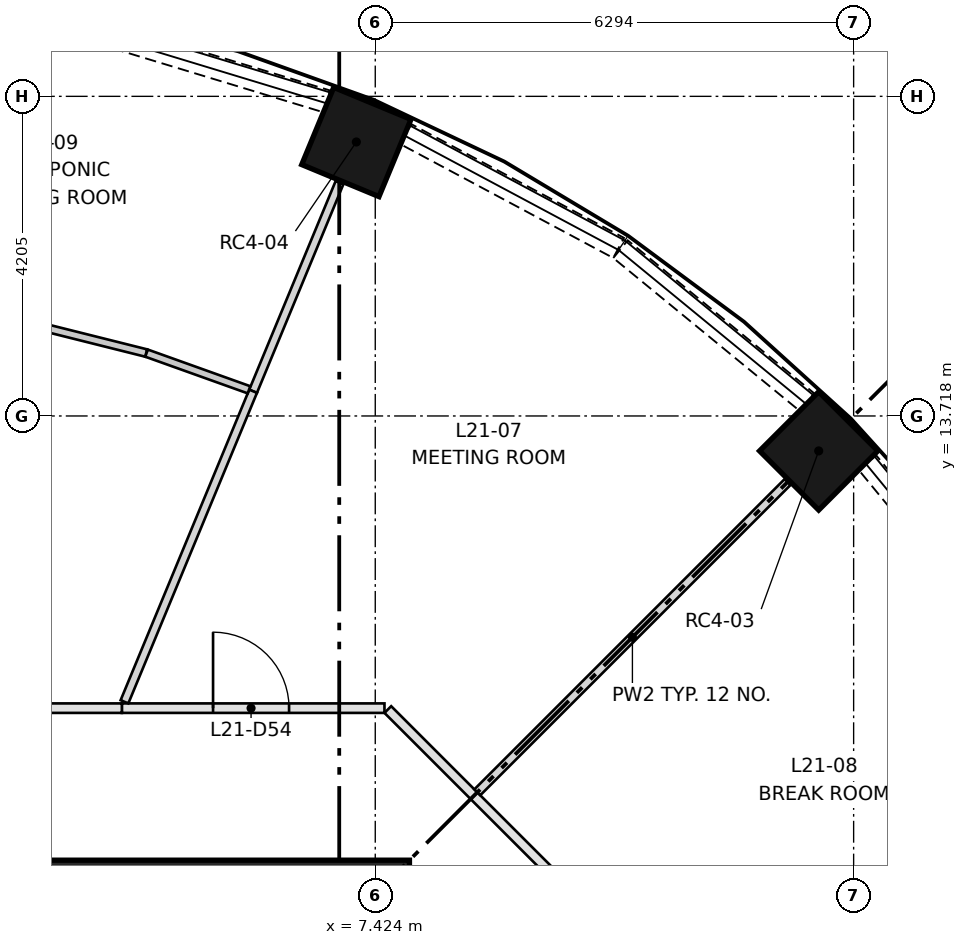
"""IFC4 building model, lengths in metres.
Left out: names, types, materials, properties, quantities, classifications, styles, units other than length and angle.
Written with IfcOpenShell. Run it as: python <this file> out.ifc"""

import sys

from ifc_helpers import new_model, si_unit, direction, frame, frame_2d, origin, origin_2d, place, context, subcontext, project, spatial, rectangle, extrude, element, fill, save


model = new_model("IFC4")
c1 = context("Model", 3, precision=1e-05, world=origin(), true_north=direction((0.0, 1.0)))
c2 = subcontext(c1, "Body", "Model", "MODEL_VIEW")
j1 = project(units=[si_unit("LENGTHUNIT", "METRE"), si_unit("PLANEANGLEUNIT", "RADIAN")], contexts=[c1])
p1 = place(None, origin())
s1 = spatial("IfcSite", under=j1, at=p1, CompositionType="ELEMENT")
p2 = place(p1, origin())
s2 = spatial("IfcBuilding", under=s1, at=p2, CompositionType="ELEMENT")
p3 = place(p2, frame((0.0, 0.0, 83.7)))
s3 = spatial("IfcBuildingStorey", under=s2, at=p3, CompositionType="ELEMENT", Elevation=83.7)
for number, where, z_axis, x_axis in (
    (1, (13.258, 13.258, 0.0), (0.0, 0.0, 1.0), (0.707, 0.707, 0.0)),
    (2, (7.175, 17.323, 0.0), (0.0, 0.0, 1.0), (0.383, 0.924, 0.0)),
):
    element("IfcColumn", number, at=place(p3, frame(where, z_axis=z_axis, x_axis=x_axis)), inside=s3, PredefinedType="COLUMN", context=c2, shape_type="SweptSolid", body=[
        extrude(rectangle(XDim=1.1, YDim=1.1, at=origin_2d()), origin(), (0.0, 0.0, 1.0), 3.65),
    ])
p4 = place(p3, frame((-7.874, 7.499, 0.0), z_axis=(0.0, 0.0, 1.0), x_axis=(1.0, 0.0, 0.0)))
e3 = element("IfcWall", 3, at=p4, inside=s3, PredefinedType="SHEAR", context=c2, shape_type="SweptSolid", body=[
    extrude(rectangle(XDim=15.748, YDim=0.75, at=frame_2d((7.874, 0.0))), origin(), (0.0, 0.0, 1.0), 3.65),
])
for number, where, z_axis, x_axis in (
    (4, (15.913, 10.651, 0.0), (0.0, 0.0, 1.0), (-0.634, 0.773, 0.0)),
    (5, (13.104, 13.9, 0.0), (0.0, 0.0, 1.0), (-0.773, 0.634, 0.0)),
):
    element("IfcWall", number, at=place(p3, frame(where, z_axis=z_axis, x_axis=x_axis)), inside=s3, PredefinedType="SOLIDWALL", context=c2, shape_type="SweptSolid", body=[
        extrude(rectangle(XDim=3.173, YDim=0.3, at=frame_2d((1.586, 0.0))), origin(), (0.0, 0.0, 1.0), 0.9),
    ])
p5 = place(p3, frame((10.626, 15.929, 0.0), z_axis=(0.0, 0.0, 1.0), x_axis=(-0.88188808669, 0.471458802606, 0.0)))
e6 = element("IfcWall", 6, at=p5, inside=s3, PredefinedType="SOLIDWALL", context=c2, shape_type="SweptSolid", body=[
    extrude(rectangle(XDim=3.172, YDim=0.3, at=frame_2d((1.586, 0.0))), origin(), (0.0, 0.0, 1.0), 0.9),
])
p6 = place(p3, frame((6.787, 17.856, 0.0), z_axis=(0.0, 0.0, 1.0), x_axis=(-0.956927923582, 0.290325591482, 0.0)))
e7 = element("IfcWall", 7, at=p6, inside=s3, PredefinedType="SOLIDWALL", context=c2, shape_type="SweptSolid", body=[
    extrude(rectangle(XDim=3.173, YDim=0.3, at=frame_2d((1.586, 0.0))), origin(), (0.0, 0.0, 1.0), 0.9),
])
p7 = place(p3, frame((8.722, 8.722, 0.0), z_axis=(0.0, 0.0, 1.0), x_axis=(0.70718294931, -0.707030604857, 0.0)))
e8 = element("IfcWall", 8, at=p7, inside=s3, PredefinedType="PARTITIONING", context=c2, shape_type="SweptSolid", body=[
    extrude(rectangle(XDim=1.603, YDim=0.125, at=frame_2d((0.801, 0.0))), origin(), (0.0, 0.0, 1.0), 3.3),
])
p8 = place(p3, frame((4.09, 9.874, 0.0), z_axis=(0.0, 0.0, 1.0), x_axis=(1.0, 0.0, 0.0)))
e9 = element("IfcWall", 9, at=p8, inside=s3, PredefinedType="PARTITIONING", context=c2, shape_type="SweptSolid", body=[
    extrude(rectangle(XDim=3.455, YDim=0.125, at=frame_2d((1.728, 0.0))), origin(), (0.0, 0.0, 1.0), 3.3),
])
p9 = place(p8, frame((1.2, 0.0, 0.0)))
e10 = element("IfcOpeningElement", 10, at=p9, cuts=e9, PredefinedType="OPENING", context=c2, shape_type="SweptSolid", body=[
    extrude(rectangle(XDim=1.0, YDim=2.1, at=frame_2d((0.5, 1.05))), frame((0.0, 0.073, 0.0), z_axis=(0.0, -1.0, 0.0), x_axis=(1.0, 0.0, 0.0)), (0.0, 0.0, 1.0), 0.145),
])
p10 = place(p3, frame((7.589, 9.856, 0.0), z_axis=(0.0, 0.0, 1.0), x_axis=(0.707030604857, -0.70718294931, 0.0)))
e11 = element("IfcWall", 11, at=p10, inside=s3, PredefinedType="PARTITIONING", context=c2, shape_type="SweptSolid", body=[
    extrude(rectangle(XDim=1.603, YDim=0.125, at=frame_2d((0.801, 0.0))), origin(), (0.0, 0.0, 1.0), 3.3),
])
p11 = place(p3, frame((-4.09, 9.874, 0.0), z_axis=(0.0, 0.0, 1.0), x_axis=(1.0, 0.0, 0.0)))
e12 = element("IfcWall", 12, at=p11, inside=s3, PredefinedType="PARTITIONING", context=c2, shape_type="SweptSolid", body=[
    extrude(rectangle(XDim=8.18, YDim=0.125, at=frame_2d((4.09, 0.0))), origin(), (0.0, 0.0, 1.0), 3.3),
])
p12 = place(p11, frame((3.6, 0.0, 0.0)))
e13 = element("IfcOpeningElement", 13, at=p12, cuts=e12, PredefinedType="OPENING", context=c2, shape_type="SweptSolid", body=[
    extrude(rectangle(XDim=1.0, YDim=2.1, at=frame_2d((0.5, 1.05))), frame((0.0, 0.073, 0.0), z_axis=(0.0, -1.0, 0.0), x_axis=(1.0, 0.0, 0.0)), (0.0, 0.0, 1.0), 0.145),
])
p13 = place(p3, frame((12.848, 12.848, 0.0), z_axis=(0.0, 0.0, 1.0), x_axis=(-0.707106781187, -0.707106781187, 0.0)))
e14 = element("IfcWall", 14, at=p13, inside=s3, PredefinedType="PARTITIONING", context=c2, shape_type="SweptSolid", body=[
    extrude(rectangle(XDim=5.772, YDim=0.11, at=frame_2d((2.886, 0.0))), origin(), (0.0, 0.0, 1.0), 3.3),
])
p14 = place(p3, frame((5.817, 14.043, 0.0), z_axis=(0.0, 0.0, 1.0), x_axis=(0.382659139036, 0.923889594764, 0.0)))
e15 = element("IfcWall", 15, at=p14, inside=s3, PredefinedType="PARTITIONING", context=c2, shape_type="SweptSolid", body=[
    extrude(rectangle(XDim=2.97, YDim=0.11, at=frame_2d((1.485, 0.0))), origin(), (0.0, 0.0, 1.0), 3.3),
])
p15 = place(p3, frame((4.125, 9.958, 0.0), z_axis=(0.0, 0.0, 1.0), x_axis=(0.382709362011, 0.923868791674, 0.0)))
e16 = element("IfcWall", 16, at=p15, inside=s3, PredefinedType="PARTITIONING", context=c2, shape_type="SweptSolid", body=[
    extrude(rectangle(XDim=4.422, YDim=0.11, at=frame_2d((2.211, 0.0))), origin(), (0.0, 0.0, 1.0), 3.3),
])
p16 = place(p3, frame((4.41, 14.546, 0.0), z_axis=(0.0, 0.0, 1.0), x_axis=(-0.970055497102, 0.242883372306, 0.0)))
e17 = element("IfcWall", 17, at=p16, inside=s3, PredefinedType="PARTITIONING", context=c2, shape_type="SweptSolid", body=[
    extrude(rectangle(XDim=1.487, YDim=0.1, at=frame_2d((0.743, 0.0))), origin(), (0.0, 0.0, 1.0), 3.3),
])
p17 = place(p3, frame((5.763, 14.062, 0.0), z_axis=(0.0, 0.0, 1.0), x_axis=(-0.941587499657, 0.33676843749, 0.0)))
e18 = element("IfcWall", 18, at=p17, inside=s3, PredefinedType="PARTITIONING", context=c2, shape_type="SweptSolid", body=[
    extrude(rectangle(XDim=1.432, YDim=0.1, at=frame_2d((0.716, 0.0))), origin(), (0.0, 0.0, 1.0), 3.3),
])
p18 = place(p9, origin())
e19 = element("IfcDoor", 19, at=p18, inside=s3, OperationType="SINGLE_SWING_LEFT", PredefinedType="DOOR", context=c2, shape_type="SweptSolid", body=[
    extrude(rectangle(XDim=1.0, YDim=2.1, at=frame_2d((0.5, 1.05))), frame((0.0, 0.025, 0.0), z_axis=(0.0, -1.0, 0.0), x_axis=(1.0, 0.0, 0.0)), (0.0, 0.0, 1.0), 0.05),
])
fill(e10, e19)
save(model, sys.argv[1])
